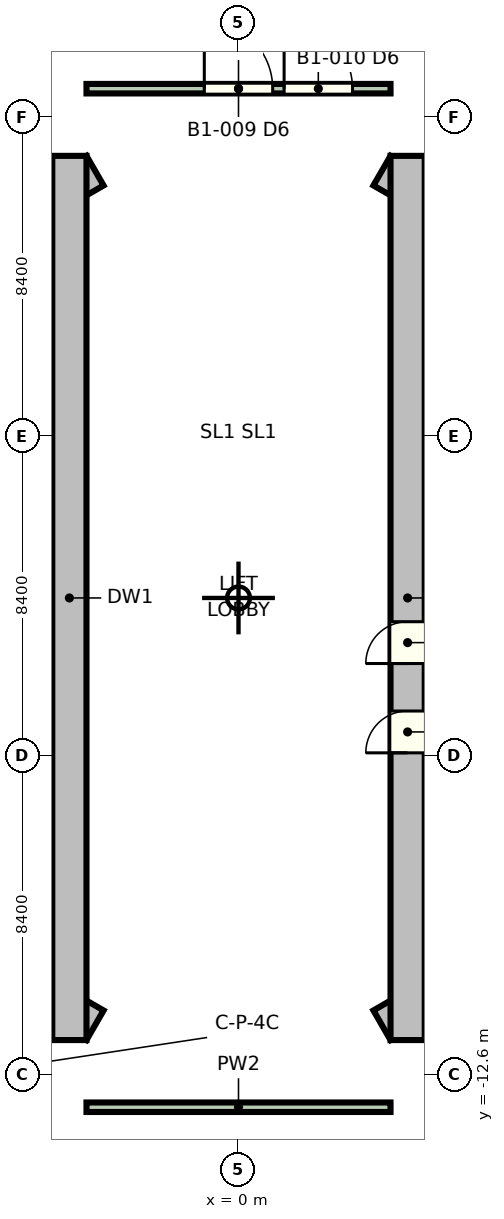
"""IFC4 building model, lengths in metres.
Left out: names, types, materials, properties, quantities, classifications, styles, units other than length and angle.
Written with IfcOpenShell. Run it as: python <this file> out.ifc"""

import sys

from ifc_helpers import new_model, si_unit, direction, frame, frame_2d, origin, place, context, subcontext, project, spatial, rectangle, extrude, element, fill, save


model = new_model("IFC4")
c1 = context("Model", 3, precision=1e-05, world=origin(), true_north=direction((0.0, 1.0)))
c2 = subcontext(c1, "Body", "Model", "MODEL_VIEW")
j1 = project(units=[si_unit("LENGTHUNIT", "METRE"), si_unit("PLANEANGLEUNIT", "RADIAN")], contexts=[c1])
p1 = place(None, origin())
s1 = spatial("IfcSite", under=j1, at=p1, CompositionType="ELEMENT")
p2 = place(p1, origin())
s2 = spatial("IfcBuilding", under=s1, at=p2, CompositionType="ELEMENT")
p3 = place(p2, frame((0.0, 0.0, -5.0)))
s3 = spatial("IfcBuildingStorey", under=s2, at=p3, CompositionType="ELEMENT", Elevation=-5.0)
for number, where, z_axis, x_axis in (
    (1, (-3.775, -11.243, 0.0), (0.0, 0.0, 1.0), (-0.866, 0.5, 0.0)),
    (2, (-8.614, 8.449, 0.0), (0.0, 0.0, 1.0), (0.866, 0.5, 0.0)),
):
    element("IfcWall", number, at=place(p3, frame(where, z_axis=z_axis, x_axis=x_axis)), inside=s3, PredefinedType="SHEAR", context=c2, shape_type="SweptSolid", body=[
        extrude(rectangle(XDim=5.587, YDim=0.9, at=frame_2d((2.794, 0.0))), origin(), (0.0, 0.0, 1.0), 4.6),
    ])
p4 = place(p3, frame((-4.45, 11.633, 0.0), z_axis=(0.0, 0.0, 1.0), x_axis=(0.0, -1.0, 0.0)))
e3 = element("IfcWall", 3, at=p4, inside=s3, PredefinedType="SHEAR", context=c2, shape_type="SweptSolid", body=[
    extrude(rectangle(XDim=23.265, YDim=0.9, at=frame_2d((11.633, 0.0))), origin(), (0.0, 0.0, 1.0), 4.6),
])
for number, where, z_axis, x_axis in (
    (4, (3.775, 11.243, 0.0), (0.0, 0.0, 1.0), (0.866, -0.5, 0.0)),
    (5, (8.614, -8.449, 0.0), (0.0, 0.0, 1.0), (-0.866, -0.5, 0.0)),
):
    element("IfcWall", number, at=place(p3, frame(where, z_axis=z_axis, x_axis=x_axis)), inside=s3, PredefinedType="SHEAR", context=c2, shape_type="SweptSolid", body=[
        extrude(rectangle(XDim=5.587, YDim=0.9, at=frame_2d((2.794, 0.0))), origin(), (0.0, 0.0, 1.0), 4.6),
    ])
p5 = place(p3, frame((4.45, -11.633, 0.0), z_axis=(0.0, 0.0, 1.0), x_axis=(0.0, 1.0, 0.0)))
e6 = element("IfcWall", 6, at=p5, inside=s3, PredefinedType="SHEAR", context=c2, shape_type="SweptSolid", body=[
    extrude(rectangle(XDim=23.265, YDim=0.9, at=frame_2d((11.633, 0.0))), origin(), (0.0, 0.0, 1.0), 4.6),
])
p6 = place(p5, frame((7.558, 0.0, 0.0)))
e7 = element("IfcOpeningElement", 7, at=p6, cuts=e6, PredefinedType="OPENING", context=c2, shape_type="SweptSolid", body=[
    extrude(rectangle(XDim=1.1, YDim=2.1, at=frame_2d((0.55, 1.05))), frame((0.0, 0.46, 0.0), z_axis=(0.0, -1.0, 0.0), x_axis=(1.0, 0.0, 0.0)), (0.0, 0.0, 1.0), 0.92),
])
p7 = place(p5, frame((9.907, 0.0, 0.0)))
e8 = element("IfcOpeningElement", 8, at=p7, cuts=e6, PredefinedType="OPENING", context=c2, shape_type="SweptSolid", body=[
    extrude(rectangle(XDim=1.1, YDim=2.1, at=frame_2d((0.55, 1.05))), frame((0.0, 0.46, 0.0), z_axis=(0.0, -1.0, 0.0), x_axis=(1.0, 0.0, 0.0)), (0.0, 0.0, 1.0), 0.92),
])
p8 = place(p3, frame((-4.0, 13.4, 0.0), z_axis=(0.0, 0.0, 1.0), x_axis=(1.0, 0.0, 0.0)))
e9 = element("IfcWall", 9, at=p8, inside=s3, PredefinedType="PARTITIONING", context=c2, shape_type="SweptSolid", body=[
    extrude(rectangle(XDim=8.0, YDim=0.25, at=frame_2d((4.0, 0.0))), origin(), (0.0, 0.0, 1.0), 4.6),
])
p9 = place(p8, frame((3.1, 0.0, 0.0)))
e10 = element("IfcOpeningElement", 10, at=p9, cuts=e9, PredefinedType="OPENING", context=c2, shape_type="SweptSolid", body=[
    extrude(rectangle(XDim=1.8, YDim=2.1, at=frame_2d((0.9, 1.05))), frame((0.0, 0.135, 0.0), z_axis=(0.0, -1.0, 0.0), x_axis=(1.0, 0.0, 0.0)), (0.0, 0.0, 1.0), 0.27),
])
p10 = place(p8, frame((5.2, 0.0, 0.0)))
e11 = element("IfcOpeningElement", 11, at=p10, cuts=e9, PredefinedType="OPENING", context=c2, shape_type="SweptSolid", body=[
    extrude(rectangle(XDim=1.8, YDim=2.1, at=frame_2d((0.9, 1.05))), frame((0.0, 0.135, 0.0), z_axis=(0.0, -1.0, 0.0), x_axis=(1.0, 0.0, 0.0)), (0.0, 0.0, 1.0), 0.27),
])
p11 = place(p3, frame((-4.0, -13.4, 0.0), z_axis=(0.0, 0.0, 1.0), x_axis=(1.0, 0.0, 0.0)))
e12 = element("IfcWall", 12, at=p11, inside=s3, PredefinedType="PARTITIONING", context=c2, shape_type="SweptSolid", body=[
    extrude(rectangle(XDim=8.0, YDim=0.25, at=frame_2d((4.0, 0.0))), origin(), (0.0, 0.0, 1.0), 4.6),
])
p12 = place(p6, origin())
e13 = element("IfcDoor", 13, at=p12, inside=s3, OperationType="SLIDING_TO_LEFT", PredefinedType="DOOR", context=c2, shape_type="SweptSolid", body=[
    extrude(rectangle(XDim=1.1, YDim=2.1, at=frame_2d((0.55, 1.05))), frame((0.0, 0.025, 0.0), z_axis=(0.0, -1.0, 0.0), x_axis=(1.0, 0.0, 0.0)), (0.0, 0.0, 1.0), 0.05),
])
fill(e7, e13)
p13 = place(p7, origin())
e14 = element("IfcDoor", 14, at=p13, inside=s3, OperationType="SLIDING_TO_LEFT", PredefinedType="DOOR", context=c2, shape_type="SweptSolid", body=[
    extrude(rectangle(XDim=1.1, YDim=2.1, at=frame_2d((0.55, 1.05))), frame((0.0, 0.025, 0.0), z_axis=(0.0, -1.0, 0.0), x_axis=(1.0, 0.0, 0.0)), (0.0, 0.0, 1.0), 0.05),
])
fill(e8, e14)
p14 = place(p9, origin())
e15 = element("IfcDoor", 15, at=p14, inside=s3, OperationType="DOUBLE_DOOR_SINGLE_SWING", PredefinedType="DOOR", context=c2, shape_type="SweptSolid", body=[
    extrude(rectangle(XDim=1.8, YDim=2.1, at=frame_2d((0.9, 1.05))), frame((0.0, 0.025, 0.0), z_axis=(0.0, -1.0, 0.0), x_axis=(1.0, 0.0, 0.0)), (0.0, 0.0, 1.0), 0.05),
])
fill(e10, e15)
p15 = place(p10, origin())
e16 = element("IfcDoor", 16, at=p15, inside=s3, OperationType="DOUBLE_DOOR_SINGLE_SWING", PredefinedType="DOOR", context=c2, shape_type="SweptSolid", body=[
    extrude(rectangle(XDim=1.8, YDim=2.1, at=frame_2d((0.9, 1.05))), frame((0.0, 0.025, 0.0), z_axis=(0.0, -1.0, 0.0), x_axis=(1.0, 0.0, 0.0)), (0.0, 0.0, 1.0), 0.05),
])
fill(e11, e16)
save(model, sys.argv[1])
